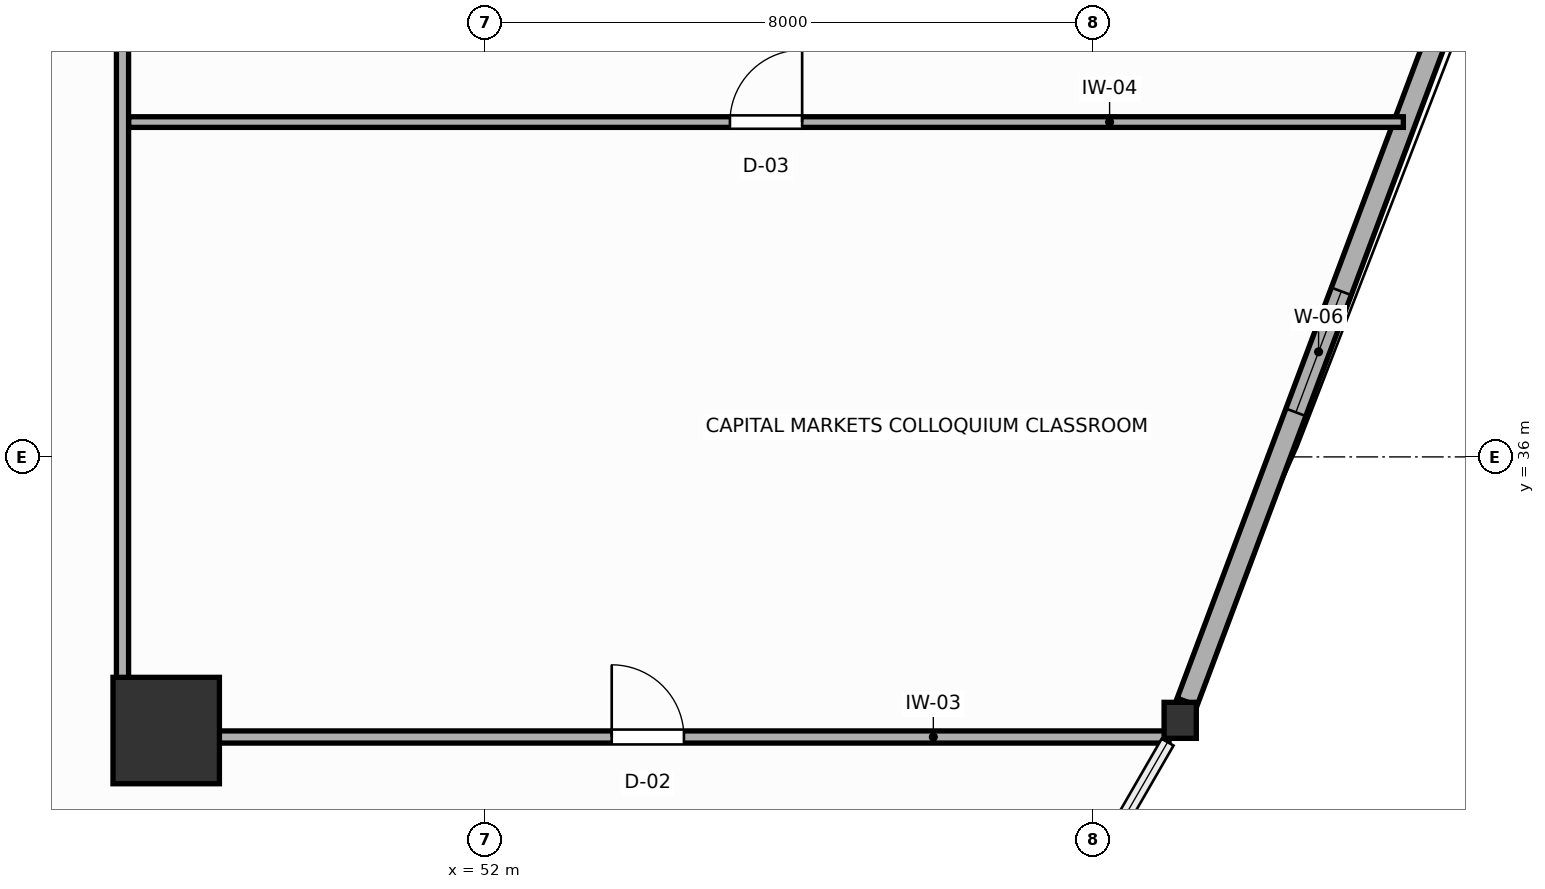
"""IFC4 building model, lengths in metres.
Left out: names, types, materials, properties, quantities, classifications, styles, units other than length and angle.
Written with IfcOpenShell. Run it as: python <this file> out.ifc"""

import sys

from ifc_helpers import new_model, si_unit, direction, frame, frame_2d, origin, origin_2d, place, context, subcontext, project, spatial, rectangle, i_section, extrude, source, transform, mapped, element, fill, save


model = new_model("IFC4")
c1 = context("Model", 3, precision=1e-05, world=origin(), true_north=direction((0.0, 1.0)))
c2 = subcontext(c1, "Body", "Model", "MODEL_VIEW")
j1 = project(units=[si_unit("LENGTHUNIT", "METRE"), si_unit("PLANEANGLEUNIT", "RADIAN")], contexts=[c1])
p1 = place(None, origin())
s1 = spatial("IfcSite", under=j1, at=p1, CompositionType="ELEMENT")
p2 = place(p1, origin())
s2 = spatial("IfcBuilding", under=s1, at=p2, CompositionType="ELEMENT")
p3 = place(p2, frame((0.0, 0.0, 83.4)))
s3 = spatial("IfcBuildingStorey", under=s2, at=p3, CompositionType="ELEMENT", Elevation=83.4)
m1 = source(origin(), c2, "Body", "SweptSolid", [
    extrude(rectangle(XDim=1.4, YDim=1.4, at=origin_2d()), origin(), (0.0, 0.0, 1.0), 3.9),
])
p4 = place(p3, frame((47.8, 32.4, 0.0), z_axis=(0.0, 0.0, 1.0), x_axis=(1.0, 0.0, 0.0)))
e1 = element("IfcColumn", 1, at=p4, inside=s3, PredefinedType="COLUMN", context=c2, shape_type="MappedRepresentation", body=[
    mapped(m1, transform((0.0, 0.0, 0.0), scale=1.0)),
])
m2 = source(origin(), c2, "Body", "SweptSolid", [
    extrude(i_section(OverallWidth=0.424, OverallDepth=0.474, WebThickness=0.045, FlangeThickness=0.072, FilletRadius=0.015, at=origin_2d()), origin(), (0.0, 0.0, 1.0), 3.9),
])
p5 = place(p3, frame((61.14, 32.534, 0.0), z_axis=(0.0, 0.0, 1.0), x_axis=(1.0, 0.0, 0.0)))
e2 = element("IfcColumn", 2, at=p5, inside=s3, PredefinedType="COLUMN", context=c2, shape_type="MappedRepresentation", body=[
    mapped(m2, transform((0.0, 0.0, 0.0), scale=1.0)),
])
p6 = place(p3, frame((61.231, 32.776, 0.0), z_axis=(0.0, 0.0, 1.0), x_axis=(0.351559441404, 0.936165561832, 0.0)))
e3 = element("IfcWall", 3, at=p6, inside=s3, PredefinedType="SOLIDWALL", context=c2, shape_type="SweptSolid", body=[
    extrude(rectangle(XDim=17.181, YDim=0.28, at=frame_2d((8.59, 0.0))), origin(), (0.0, 0.0, 1.0), 2.08),
])
p7 = place(p6, frame((4.07, 0.0, 0.75)))
e4 = element("IfcOpeningElement", 4, at=p7, cuts=e3, PredefinedType="OPENING", context=c2, shape_type="SweptSolid", body=[
    extrude(rectangle(XDim=1.7, YDim=1.15, at=frame_2d((0.85, 0.575))), frame((0.0, 0.15, 0.0), z_axis=(0.0, -1.0, 0.0), x_axis=(1.0, 0.0, 0.0)), (0.0, 0.0, 1.0), 0.3),
])
p8 = place(p3, frame((47.225, 32.31, 0.0), z_axis=(0.0, 0.0, 1.0), x_axis=(0.0, 1.0, 0.0)))
e5 = element("IfcWall", 5, at=p8, inside=s3, PredefinedType="PARTITIONING", context=c2, shape_type="SweptSolid", body=[
    extrude(rectangle(XDim=23.538, YDim=0.16, at=frame_2d((11.769, 0.0))), origin(), (0.0, 0.0, 1.0), 2.24),
])
p9 = place(p3, frame((47.307, 32.315, 0.0), z_axis=(0.0, 0.0, 1.0), x_axis=(1.0, 0.0, 0.0)))
e6 = element("IfcWall", 6, at=p9, inside=s3, PredefinedType="PARTITIONING", context=c2, shape_type="SweptSolid", body=[
    extrude(rectangle(XDim=13.687, YDim=0.16, at=frame_2d((6.843, 0.0))), origin(), (0.0, 0.0, 1.0), 2.24),
])
p10 = place(p9, frame((6.354, 0.0, 0.0)))
e7 = element("IfcOpeningElement", 7, at=p10, cuts=e6, PredefinedType="OPENING", context=c2, shape_type="SweptSolid", body=[
    extrude(rectangle(XDim=0.95, YDim=2.05, at=frame_2d((0.475, 1.025))), frame((0.0, 0.09, 0.0), z_axis=(0.0, -1.0, 0.0), x_axis=(1.0, 0.0, 0.0)), (0.0, 0.0, 1.0), 0.18),
])
p11 = place(p3, frame((47.307, 40.405, 0.0), z_axis=(0.0, 0.0, 1.0), x_axis=(1.0, 0.0, 0.0)))
e8 = element("IfcWall", 8, at=p11, inside=s3, PredefinedType="PARTITIONING", context=c2, shape_type="SweptSolid", body=[
    extrude(rectangle(XDim=16.769, YDim=0.14, at=frame_2d((8.385, 0.0))), origin(), (0.0, 0.0, 1.0), 3.68),
])
p12 = place(p11, frame((7.909, 0.0, 0.0)))
e9 = element("IfcOpeningElement", 9, at=p12, cuts=e8, PredefinedType="OPENING", context=c2, shape_type="SweptSolid", body=[
    extrude(rectangle(XDim=0.95, YDim=2.05, at=frame_2d((0.475, 1.025))), frame((0.0, 0.08, 0.0), z_axis=(0.0, -1.0, 0.0), x_axis=(1.0, 0.0, 0.0)), (0.0, 0.0, 1.0), 0.16),
])
p13 = place(p7, origin())
e10 = element("IfcWindow", 10, at=p13, inside=s3, PartitioningType="SINGLE_PANEL", PredefinedType="WINDOW", context=c2, shape_type="SweptSolid", body=[
    extrude(rectangle(XDim=1.7, YDim=1.15, at=frame_2d((0.85, 0.575))), frame((0.0, 0.03, 0.0), z_axis=(0.0, -1.0, 0.0), x_axis=(1.0, 0.0, 0.0)), (0.0, 0.0, 1.0), 0.06),
])
fill(e4, e10)
p14 = place(p10, origin())
e11 = element("IfcDoor", 11, at=p14, inside=s3, OperationType="SINGLE_SWING_LEFT", PredefinedType="DOOR", context=c2, shape_type="SweptSolid", body=[
    extrude(rectangle(XDim=0.95, YDim=2.05, at=frame_2d((0.475, 1.025))), frame((0.0, 0.025, 0.0), z_axis=(0.0, -1.0, 0.0), x_axis=(1.0, 0.0, 0.0)), (0.0, 0.0, 1.0), 0.05),
])
fill(e7, e11)
p15 = place(p12, origin())
e12 = element("IfcDoor", 12, at=p15, inside=s3, OperationType="SINGLE_SWING_RIGHT", PredefinedType="DOOR", context=c2, shape_type="SweptSolid", body=[
    extrude(rectangle(XDim=0.95, YDim=2.05, at=frame_2d((0.475, 1.025))), frame((0.0, 0.025, 0.0), z_axis=(0.0, -1.0, 0.0), x_axis=(1.0, 0.0, 0.0)), (0.0, 0.0, 1.0), 0.05),
])
fill(e9, e12)
save(model, sys.argv[1])
